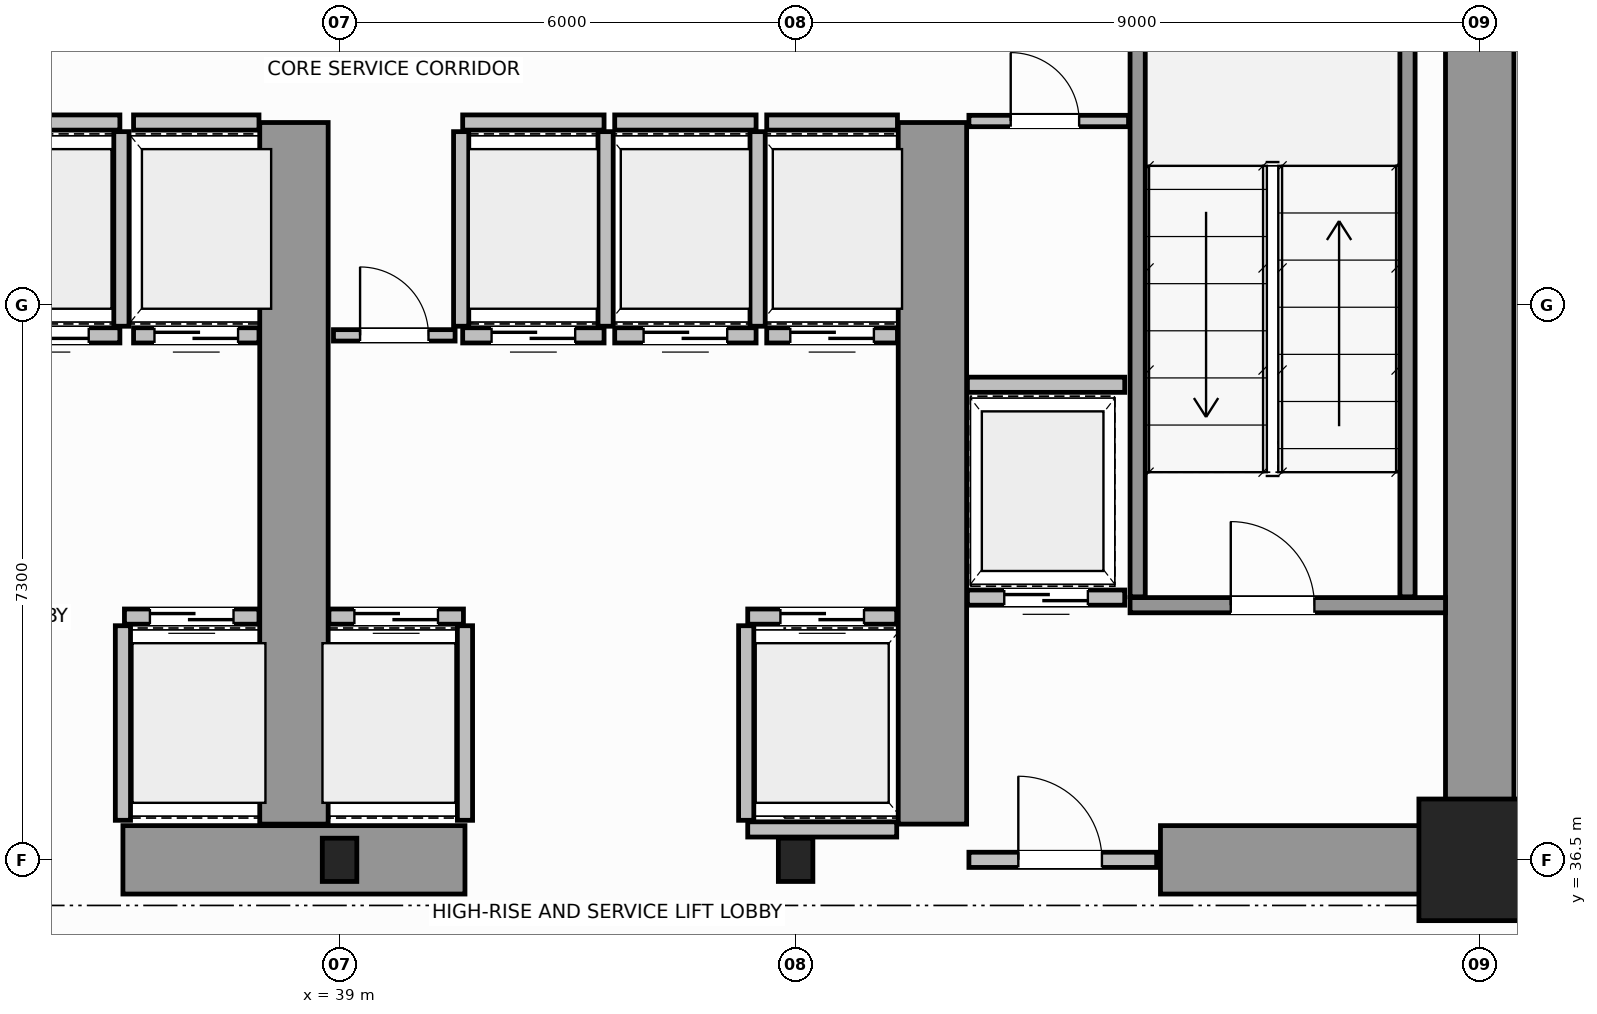
"""IFC4 building model, lengths in metres.
Left out: names, types, materials, properties, quantities, classifications, styles, units other than length and angle.
Written with IfcOpenShell. Run it as: python <this file> out.ifc"""

import sys

from ifc_helpers import new_model, si_unit, direction, frame, frame_2d, origin, origin_2d, place, context, subcontext, project, spatial, rectangle, i_section, extrude, source, transform, mapped, element, fill, save


model = new_model("IFC4")
c1 = context("Model", 3, precision=1e-05, world=origin(), true_north=direction((0.0, 1.0)))
c2 = subcontext(c1, "Body", "Model", "MODEL_VIEW")
j1 = project(units=[si_unit("LENGTHUNIT", "METRE"), si_unit("PLANEANGLEUNIT", "RADIAN")], contexts=[c1])
p1 = place(None, origin())
s1 = spatial("IfcSite", under=j1, at=p1, CompositionType="ELEMENT")
p2 = place(p1, origin())
s2 = spatial("IfcBuilding", under=s1, at=p2, CompositionType="ELEMENT")
p3 = place(p2, frame((0.0, 0.0, 5.6)))
s3 = spatial("IfcBuildingStorey", under=s2, at=p3, CompositionType="ELEMENT", Elevation=5.6)
m1 = source(origin(), c2, "Body", "SweptSolid", [
    extrude(i_section(OverallWidth=0.454, OverallDepth=0.569, WebThickness=0.078, FlangeThickness=0.08, FilletRadius=0.015, at=origin_2d()), origin(), (0.0, 0.0, 1.0), 4.4),
])
for number, where, z_axis, x_axis in (
    (1, (39.0, 36.5, 0.0), (0.0, 0.0, 1.0), (1.0, 0.0, 0.0)),
    (2, (45.0, 36.5, 0.0), (0.0, 0.0, 1.0), (1.0, 0.0, 0.0)),
):
    element("IfcColumn", number, at=place(p3, frame(where, z_axis=z_axis, x_axis=x_axis)), inside=s3, PredefinedType="COLUMN", context=c2, shape_type="MappedRepresentation", body=[
        mapped(m1, transform((0.0, 0.0, 0.0), scale=1.0)),
    ])
m2 = source(origin(), c2, "Body", "SweptSolid", [
    extrude(rectangle(XDim=1.6, YDim=1.6, at=origin_2d()), origin(), (0.0, 0.0, 1.0), 4.4),
])
p4 = place(p3, frame((54.0, 36.5, 0.0), z_axis=(0.0, 0.0, 1.0), x_axis=(1.0, 0.0, 0.0)))
e3 = element("IfcColumn", 3, at=p4, inside=s3, PredefinedType="COLUMN", context=c2, shape_type="MappedRepresentation", body=[
    mapped(m2, transform((0.0, 0.0, 0.0), scale=1.0)),
])
p5 = place(p3, frame((54.0, 36.5, 0.0), z_axis=(0.0, 0.0, 1.0), x_axis=(0.0, 1.0, 0.0)))
e4 = element("IfcWall", 4, at=p5, inside=s3, PredefinedType="SHEAR", context=c2, shape_type="SweptSolid", body=[
    extrude(rectangle(XDim=14.5, YDim=0.9, at=frame_2d((7.25, 0.0))), origin(), (0.0, 0.0, 1.0), 4.4),
])
p6 = place(p3, frame((36.15, 36.5, 0.0), z_axis=(0.0, 0.0, 1.0), x_axis=(1.0, 0.0, 0.0)))
e5 = element("IfcWall", 5, at=p6, inside=s3, PredefinedType="SHEAR", context=c2, shape_type="SweptSolid", body=[
    extrude(rectangle(XDim=4.5, YDim=0.9, at=frame_2d((2.25, 0.0))), origin(), (0.0, 0.0, 1.0), 4.4),
])
p7 = place(p3, frame((49.8, 36.5, 0.0), z_axis=(0.0, 0.0, 1.0), x_axis=(1.0, 0.0, 0.0)))
e6 = element("IfcWall", 6, at=p7, inside=s3, PredefinedType="SHEAR", context=c2, shape_type="SweptSolid", body=[
    extrude(rectangle(XDim=3.73, YDim=0.9, at=frame_2d((1.865, 0.0))), origin(), (0.0, 0.0, 1.0), 2.92),
])
for number, where, z_axis, x_axis in (
    (7, (38.4, 36.97, 0.0), (0.0, 0.0, 1.0), (0.0, 1.0, 0.0)),
    (8, (46.8, 36.97, 0.0), (0.0, 0.0, 1.0), (0.0, 1.0, 0.0)),
):
    element("IfcWall", number, at=place(p3, frame(where, z_axis=z_axis, x_axis=x_axis)), inside=s3, PredefinedType="SHEAR", context=c2, shape_type="SweptSolid", body=[
        extrude(rectangle(XDim=9.23, YDim=0.9, at=frame_2d((4.615, 0.0))), origin(), (0.0, 0.0, 1.0), 4.4),
    ])
p8 = place(p3, frame((49.4, 39.85, 0.0), z_axis=(0.0, 0.0, 1.0), x_axis=(1.0, 0.0, 0.0)))
e9 = element("IfcWall", 9, at=p8, inside=s3, PredefinedType="SOLIDWALL", context=c2, shape_type="SweptSolid", body=[
    extrude(rectangle(XDim=4.15, YDim=0.2, at=frame_2d((2.075, 0.0))), origin(), (0.0, 0.0, 1.0), 4.4),
])
p9 = place(p8, frame((1.325, 0.0, 0.0)))
e10 = element("IfcOpeningElement", 10, at=p9, cuts=e9, PredefinedType="OPENING", context=c2, shape_type="SweptSolid", body=[
    extrude(rectangle(XDim=1.1, YDim=2.15, at=frame_2d((0.55, 1.075))), frame((0.0, 0.11, 0.0), z_axis=(0.0, -1.0, 0.0), x_axis=(1.0, 0.0, 0.0)), (0.0, 0.0, 1.0), 0.22),
])
for number, where, z_axis, x_axis in (
    (11, (49.5, 39.96, 0.0), (0.0, 0.0, 1.0), (0.0, 1.0, 0.0)),
    (12, (53.05, 39.96, 0.0), (0.0, 0.0, 1.0), (0.0, 1.0, 0.0)),
):
    element("IfcWall", number, at=place(p3, frame(where, z_axis=z_axis, x_axis=x_axis)), inside=s3, PredefinedType="SOLIDWALL", context=c2, shape_type="SweptSolid", body=[
        extrude(rectangle(XDim=9.93, YDim=0.2, at=frame_2d((4.965, 0.0))), origin(), (0.0, 0.0, 1.0), 4.4),
    ])
p10 = place(p3, frame((47.28, 36.5, 0.0), z_axis=(0.0, 0.0, 1.0), x_axis=(1.0, 0.0, 0.0)))
e13 = element("IfcWall", 13, at=p10, inside=s3, PredefinedType="SOLIDWALL", context=c2, shape_type="SweptSolid", body=[
    extrude(rectangle(XDim=2.47, YDim=0.2, at=frame_2d((1.235, 0.0))), origin(), (0.0, 0.0, 1.0), 2.91),
])
p11 = place(p10, frame((0.65, 0.0, 0.0)))
e14 = element("IfcOpeningElement", 14, at=p11, cuts=e13, PredefinedType="OPENING", context=c2, shape_type="SweptSolid", body=[
    extrude(rectangle(XDim=1.1, YDim=2.15, at=frame_2d((0.55, 1.075))), frame((0.0, 0.11, 0.0), z_axis=(0.0, -1.0, 0.0), x_axis=(1.0, 0.0, 0.0)), (0.0, 0.0, 1.0), 0.22),
])
p12 = place(p3, frame((36.17, 39.7, 0.0), z_axis=(0.0, 0.0, 1.0), x_axis=(1.0, 0.0, 0.0)))
e15 = element("IfcWall", 15, at=p12, inside=s3, PredefinedType="SOLIDWALL", context=c2, shape_type="SweptSolid", body=[
    extrude(rectangle(XDim=1.77, YDim=0.2, at=frame_2d((0.885, 0.0))), origin(), (0.0, 0.0, 1.0), 4.12),
])
p13 = place(p12, frame((0.335, 0.0, 0.0)))
e16 = element("IfcOpeningElement", 16, at=p13, cuts=e15, PredefinedType="OPENING", context=c2, shape_type="SweptSolid", body=[
    extrude(rectangle(XDim=1.1, YDim=2.15, at=frame_2d((0.55, 1.075))), frame((0.0, 0.11, 0.0), z_axis=(0.0, -1.0, 0.0), x_axis=(1.0, 0.0, 0.0)), (0.0, 0.0, 1.0), 0.22),
])
p14 = place(p3, frame((36.15, 37.02, 0.0), z_axis=(0.0, 0.0, 1.0), x_axis=(0.0, 1.0, 0.0)))
e17 = element("IfcWall", 17, at=p14, inside=s3, PredefinedType="SOLIDWALL", context=c2, shape_type="SweptSolid", body=[
    extrude(rectangle(XDim=2.56, YDim=0.2, at=frame_2d((1.28, 0.0))), origin(), (0.0, 0.0, 1.0), 4.12),
])
p15 = place(p3, frame((34.19, 43.4, 0.0), z_axis=(0.0, 0.0, 1.0), x_axis=(1.0, 0.0, 0.0)))
e18 = element("IfcWall", 18, at=p15, inside=s3, PredefinedType="SOLIDWALL", context=c2, shape_type="SweptSolid", body=[
    extrude(rectangle(XDim=1.92, YDim=0.2, at=frame_2d((0.96, 0.0))), origin(), (0.0, 0.0, 1.0), 4.12),
])
p16 = place(p15, frame((0.41, 0.0, 0.0)))
e19 = element("IfcOpeningElement", 19, at=p16, cuts=e18, PredefinedType="OPENING", context=c2, shape_type="SweptSolid", body=[
    extrude(rectangle(XDim=1.1, YDim=2.15, at=frame_2d((0.55, 1.075))), frame((0.0, 0.11, 0.0), z_axis=(0.0, -1.0, 0.0), x_axis=(1.0, 0.0, 0.0)), (0.0, 0.0, 1.0), 0.22),
])
p17 = place(p3, frame((34.19, 46.2, 0.0), z_axis=(0.0, 0.0, 1.0), x_axis=(1.0, 0.0, 0.0)))
e20 = element("IfcWall", 20, at=p17, inside=s3, PredefinedType="SOLIDWALL", context=c2, shape_type="SweptSolid", body=[
    extrude(rectangle(XDim=1.92, YDim=0.2, at=frame_2d((0.96, 0.0))), origin(), (0.0, 0.0, 1.0), 4.12),
])
p18 = place(p3, frame((36.13, 43.52, 0.0), z_axis=(0.0, 0.0, 1.0), x_axis=(0.0, 1.0, 0.0)))
e21 = element("IfcWall", 21, at=p18, inside=s3, PredefinedType="SOLIDWALL", context=c2, shape_type="SweptSolid", body=[
    extrude(rectangle(XDim=2.56, YDim=0.2, at=frame_2d((1.28, 0.0))), origin(), (0.0, 0.0, 1.0), 4.12),
])
p19 = place(p3, frame((36.29, 43.4, 0.0), z_axis=(0.0, 0.0, 1.0), x_axis=(1.0, 0.0, 0.0)))
e22 = element("IfcWall", 22, at=p19, inside=s3, PredefinedType="SOLIDWALL", context=c2, shape_type="SweptSolid", body=[
    extrude(rectangle(XDim=1.65, YDim=0.2, at=frame_2d((0.825, 0.0))), origin(), (0.0, 0.0, 1.0), 4.12),
])
p20 = place(p19, frame((0.275, 0.0, 0.0)))
e23 = element("IfcOpeningElement", 23, at=p20, cuts=e22, PredefinedType="OPENING", context=c2, shape_type="SweptSolid", body=[
    extrude(rectangle(XDim=1.1, YDim=2.15, at=frame_2d((0.55, 1.075))), frame((0.0, 0.11, 0.0), z_axis=(0.0, -1.0, 0.0), x_axis=(1.0, 0.0, 0.0)), (0.0, 0.0, 1.0), 0.22),
])
p21 = place(p3, frame((36.29, 46.2, 0.0), z_axis=(0.0, 0.0, 1.0), x_axis=(1.0, 0.0, 0.0)))
e24 = element("IfcWall", 24, at=p21, inside=s3, PredefinedType="SOLIDWALL", context=c2, shape_type="SweptSolid", body=[
    extrude(rectangle(XDim=1.65, YDim=0.2, at=frame_2d((0.825, 0.0))), origin(), (0.0, 0.0, 1.0), 4.12),
])
p22 = place(p3, frame((38.86, 39.7, 0.0), z_axis=(0.0, 0.0, 1.0), x_axis=(1.0, 0.0, 0.0)))
e25 = element("IfcWall", 25, at=p22, inside=s3, PredefinedType="SOLIDWALL", context=c2, shape_type="SweptSolid", body=[
    extrude(rectangle(XDim=1.77, YDim=0.2, at=frame_2d((0.885, 0.0))), origin(), (0.0, 0.0, 1.0), 4.12),
])
p23 = place(p22, frame((0.335, 0.0, 0.0)))
e26 = element("IfcOpeningElement", 26, at=p23, cuts=e25, PredefinedType="OPENING", context=c2, shape_type="SweptSolid", body=[
    extrude(rectangle(XDim=1.1, YDim=2.15, at=frame_2d((0.55, 1.075))), frame((0.0, 0.11, 0.0), z_axis=(0.0, -1.0, 0.0), x_axis=(1.0, 0.0, 0.0)), (0.0, 0.0, 1.0), 0.22),
])
p24 = place(p3, frame((40.65, 37.02, 0.0), z_axis=(0.0, 0.0, 1.0), x_axis=(0.0, 1.0, 0.0)))
e27 = element("IfcWall", 27, at=p24, inside=s3, PredefinedType="SOLIDWALL", context=c2, shape_type="SweptSolid", body=[
    extrude(rectangle(XDim=2.56, YDim=0.2, at=frame_2d((1.28, 0.0))), origin(), (0.0, 0.0, 1.0), 4.12),
])
p25 = place(p3, frame((44.37, 39.7, 0.0), z_axis=(0.0, 0.0, 1.0), x_axis=(1.0, 0.0, 0.0)))
e28 = element("IfcWall", 28, at=p25, inside=s3, PredefinedType="SOLIDWALL", context=c2, shape_type="SweptSolid", body=[
    extrude(rectangle(XDim=1.96, YDim=0.2, at=frame_2d((0.98, 0.0))), origin(), (0.0, 0.0, 1.0), 4.12),
])
p26 = place(p25, frame((0.43, 0.0, 0.0)))
e29 = element("IfcOpeningElement", 29, at=p26, cuts=e28, PredefinedType="OPENING", context=c2, shape_type="SweptSolid", body=[
    extrude(rectangle(XDim=1.1, YDim=2.15, at=frame_2d((0.55, 1.075))), frame((0.0, 0.11, 0.0), z_axis=(0.0, -1.0, 0.0), x_axis=(1.0, 0.0, 0.0)), (0.0, 0.0, 1.0), 0.22),
])
p27 = place(p3, frame((44.37, 36.9, 0.0), z_axis=(0.0, 0.0, 1.0), x_axis=(1.0, 0.0, 0.0)))
e30 = element("IfcWall", 30, at=p27, inside=s3, PredefinedType="SOLIDWALL", context=c2, shape_type="SweptSolid", body=[
    extrude(rectangle(XDim=1.96, YDim=0.2, at=frame_2d((0.98, 0.0))), origin(), (0.0, 0.0, 1.0), 2.91),
])
p28 = place(p3, frame((44.35, 37.02, 0.0), z_axis=(0.0, 0.0, 1.0), x_axis=(0.0, 1.0, 0.0)))
e31 = element("IfcWall", 31, at=p28, inside=s3, PredefinedType="SOLIDWALL", context=c2, shape_type="SweptSolid", body=[
    extrude(rectangle(XDim=2.56, YDim=0.2, at=frame_2d((1.28, 0.0))), origin(), (0.0, 0.0, 1.0), 4.12),
])
p29 = place(p3, frame((40.62, 43.4, 0.0), z_axis=(0.0, 0.0, 1.0), x_axis=(1.0, 0.0, 0.0)))
e32 = element("IfcWall", 32, at=p29, inside=s3, PredefinedType="SOLIDWALL", context=c2, shape_type="SweptSolid", body=[
    extrude(rectangle(XDim=1.86, YDim=0.2, at=frame_2d((0.93, 0.0))), origin(), (0.0, 0.0, 1.0), 4.12),
])
p30 = place(p29, frame((0.38, 0.0, 0.0)))
e33 = element("IfcOpeningElement", 33, at=p30, cuts=e32, PredefinedType="OPENING", context=c2, shape_type="SweptSolid", body=[
    extrude(rectangle(XDim=1.1, YDim=2.15, at=frame_2d((0.55, 1.075))), frame((0.0, 0.11, 0.0), z_axis=(0.0, -1.0, 0.0), x_axis=(1.0, 0.0, 0.0)), (0.0, 0.0, 1.0), 0.22),
])
p31 = place(p3, frame((40.62, 46.2, 0.0), z_axis=(0.0, 0.0, 1.0), x_axis=(1.0, 0.0, 0.0)))
e34 = element("IfcWall", 34, at=p31, inside=s3, PredefinedType="SOLIDWALL", context=c2, shape_type="SweptSolid", body=[
    extrude(rectangle(XDim=1.86, YDim=0.2, at=frame_2d((0.93, 0.0))), origin(), (0.0, 0.0, 1.0), 4.12),
])
for number, where, z_axis, x_axis in (
    (35, (40.6, 43.52, 0.0), (0.0, 0.0, 1.0), (0.0, 1.0, 0.0)),
    (36, (42.5, 43.52, 0.0), (0.0, 0.0, 1.0), (0.0, 1.0, 0.0)),
):
    element("IfcWall", number, at=place(p3, frame(where, z_axis=z_axis, x_axis=x_axis)), inside=s3, PredefinedType="SOLIDWALL", context=c2, shape_type="SweptSolid", body=[
        extrude(rectangle(XDim=2.56, YDim=0.2, at=frame_2d((1.28, 0.0))), origin(), (0.0, 0.0, 1.0), 4.12),
    ])
p32 = place(p3, frame((42.62, 43.4, 0.0), z_axis=(0.0, 0.0, 1.0), x_axis=(1.0, 0.0, 0.0)))
e37 = element("IfcWall", 37, at=p32, inside=s3, PredefinedType="SOLIDWALL", context=c2, shape_type="SweptSolid", body=[
    extrude(rectangle(XDim=1.86, YDim=0.2, at=frame_2d((0.93, 0.0))), origin(), (0.0, 0.0, 1.0), 4.12),
])
p33 = place(p32, frame((0.38, 0.0, 0.0)))
e38 = element("IfcOpeningElement", 38, at=p33, cuts=e37, PredefinedType="OPENING", context=c2, shape_type="SweptSolid", body=[
    extrude(rectangle(XDim=1.1, YDim=2.15, at=frame_2d((0.55, 1.075))), frame((0.0, 0.11, 0.0), z_axis=(0.0, -1.0, 0.0), x_axis=(1.0, 0.0, 0.0)), (0.0, 0.0, 1.0), 0.22),
])
p34 = place(p3, frame((42.62, 46.2, 0.0), z_axis=(0.0, 0.0, 1.0), x_axis=(1.0, 0.0, 0.0)))
e39 = element("IfcWall", 39, at=p34, inside=s3, PredefinedType="SOLIDWALL", context=c2, shape_type="SweptSolid", body=[
    extrude(rectangle(XDim=1.86, YDim=0.2, at=frame_2d((0.93, 0.0))), origin(), (0.0, 0.0, 1.0), 4.12),
])
p35 = place(p3, frame((44.5, 43.52, 0.0), z_axis=(0.0, 0.0, 1.0), x_axis=(0.0, 1.0, 0.0)))
e40 = element("IfcWall", 40, at=p35, inside=s3, PredefinedType="SOLIDWALL", context=c2, shape_type="SweptSolid", body=[
    extrude(rectangle(XDim=2.56, YDim=0.2, at=frame_2d((1.28, 0.0))), origin(), (0.0, 0.0, 1.0), 4.12),
])
p36 = place(p3, frame((44.62, 43.4, 0.0), z_axis=(0.0, 0.0, 1.0), x_axis=(1.0, 0.0, 0.0)))
e41 = element("IfcWall", 41, at=p36, inside=s3, PredefinedType="SOLIDWALL", context=c2, shape_type="SweptSolid", body=[
    extrude(rectangle(XDim=1.72, YDim=0.2, at=frame_2d((0.86, 0.0))), origin(), (0.0, 0.0, 1.0), 4.12),
])
p37 = place(p36, frame((0.31, 0.0, 0.0)))
e42 = element("IfcOpeningElement", 42, at=p37, cuts=e41, PredefinedType="OPENING", context=c2, shape_type="SweptSolid", body=[
    extrude(rectangle(XDim=1.1, YDim=2.15, at=frame_2d((0.55, 1.075))), frame((0.0, 0.11, 0.0), z_axis=(0.0, -1.0, 0.0), x_axis=(1.0, 0.0, 0.0)), (0.0, 0.0, 1.0), 0.22),
])
p38 = place(p3, frame((44.62, 46.2, 0.0), z_axis=(0.0, 0.0, 1.0), x_axis=(1.0, 0.0, 0.0)))
e43 = element("IfcWall", 43, at=p38, inside=s3, PredefinedType="SOLIDWALL", context=c2, shape_type="SweptSolid", body=[
    extrude(rectangle(XDim=1.72, YDim=0.2, at=frame_2d((0.86, 0.0))), origin(), (0.0, 0.0, 1.0), 4.12),
])
p39 = place(p3, frame((47.26, 39.95, 0.0), z_axis=(0.0, 0.0, 1.0), x_axis=(1.0, 0.0, 0.0)))
e44 = element("IfcWall", 44, at=p39, inside=s3, PredefinedType="SOLIDWALL", context=c2, shape_type="SweptSolid", body=[
    extrude(rectangle(XDim=2.07, YDim=0.2, at=frame_2d((1.035, 0.0))), origin(), (0.0, 0.0, 1.0), 4.12),
])
p40 = place(p39, frame((0.485, 0.0, 0.0)))
e45 = element("IfcOpeningElement", 45, at=p40, cuts=e44, PredefinedType="OPENING", context=c2, shape_type="SweptSolid", body=[
    extrude(rectangle(XDim=1.1, YDim=2.15, at=frame_2d((0.55, 1.075))), frame((0.0, 0.11, 0.0), z_axis=(0.0, -1.0, 0.0), x_axis=(1.0, 0.0, 0.0)), (0.0, 0.0, 1.0), 0.22),
])
p41 = place(p3, frame((47.26, 42.75, 0.0), z_axis=(0.0, 0.0, 1.0), x_axis=(1.0, 0.0, 0.0)))
e46 = element("IfcWall", 46, at=p41, inside=s3, PredefinedType="SOLIDWALL", context=c2, shape_type="SweptSolid", body=[
    extrude(rectangle(XDim=2.07, YDim=0.2, at=frame_2d((1.035, 0.0))), origin(), (0.0, 0.0, 1.0), 4.12),
])
p42 = place(p3, frame((47.28, 46.22, 0.0), z_axis=(0.0, 0.0, 1.0), x_axis=(1.0, 0.0, 0.0)))
e47 = element("IfcWall", 47, at=p42, inside=s3, PredefinedType="PARTITIONING", context=c2, shape_type="SweptSolid", body=[
    extrude(rectangle(XDim=2.1, YDim=0.15, at=frame_2d((1.05, 0.0))), origin(), (0.0, 0.0, 1.0), 4.12),
])
p43 = place(p42, frame((0.55, 0.0, 0.0)))
e48 = element("IfcOpeningElement", 48, at=p43, cuts=e47, PredefinedType="OPENING", context=c2, shape_type="SweptSolid", body=[
    extrude(rectangle(XDim=0.9, YDim=2.1, at=frame_2d((0.45, 1.05))), frame((0.0, 0.085, 0.0), z_axis=(0.0, -1.0, 0.0), x_axis=(1.0, 0.0, 0.0)), (0.0, 0.0, 1.0), 0.17),
])
p44 = place(p3, frame((38.92, 43.4, 0.0), z_axis=(0.0, 0.0, 1.0), x_axis=(1.0, 0.0, 0.0)))
e49 = element("IfcWall", 49, at=p44, inside=s3, PredefinedType="PARTITIONING", context=c2, shape_type="SweptSolid", body=[
    extrude(rectangle(XDim=1.6, YDim=0.15, at=frame_2d((0.8, 0.0))), origin(), (0.0, 0.0, 1.0), 4.12),
])
p45 = place(p44, frame((0.35, 0.0, 0.0)))
e50 = element("IfcOpeningElement", 50, at=p45, cuts=e49, PredefinedType="OPENING", context=c2, shape_type="SweptSolid", body=[
    extrude(rectangle(XDim=0.9, YDim=2.1, at=frame_2d((0.45, 1.05))), frame((0.0, 0.085, 0.0), z_axis=(0.0, -1.0, 0.0), x_axis=(1.0, 0.0, 0.0)), (0.0, 0.0, 1.0), 0.17),
])
m3 = source(origin(), c2, "Body", "SweptSolid", [
    extrude(rectangle(XDim=1.1, YDim=2.15, at=frame_2d((0.55, 1.075))), frame((0.0, 0.025, 0.0), z_axis=(0.0, -1.0, 0.0), x_axis=(1.0, 0.0, 0.0)), (0.0, 0.0, 1.0), 0.05),
])
p46 = place(p9, origin())
e51 = element("IfcDoor", 51, at=p46, inside=s3, OperationType="SINGLE_SWING_RIGHT", PredefinedType="DOOR", context=c2, shape_type="MappedRepresentation", body=[
    mapped(m3, transform((0.0, 0.0, 0.0), scale=1.0)),
])
fill(e10, e51)
p47 = place(p11, origin())
e52 = element("IfcDoor", 52, at=p47, inside=s3, OperationType="SINGLE_SWING_LEFT", PredefinedType="DOOR", context=c2, shape_type="MappedRepresentation", body=[
    mapped(m3, transform((0.0, 0.0, 0.0), scale=1.0)),
])
fill(e14, e52)
p48 = place(p13, origin())
e53 = element("IfcDoor", 53, at=p48, inside=s3, OperationType="DOUBLE_DOOR_SLIDING", PredefinedType="DOOR", context=c2, shape_type="MappedRepresentation", body=[
    mapped(m3, transform((0.0, 0.0, 0.0), scale=1.0)),
])
fill(e16, e53)
p49 = place(p16, origin())
e54 = element("IfcDoor", 54, at=p49, inside=s3, OperationType="DOUBLE_DOOR_SLIDING", PredefinedType="DOOR", context=c2, shape_type="MappedRepresentation", body=[
    mapped(m3, transform((0.0, 0.0, 0.0), scale=1.0)),
])
fill(e19, e54)
p50 = place(p20, origin())
e55 = element("IfcDoor", 55, at=p50, inside=s3, OperationType="DOUBLE_DOOR_SLIDING", PredefinedType="DOOR", context=c2, shape_type="MappedRepresentation", body=[
    mapped(m3, transform((0.0, 0.0, 0.0), scale=1.0)),
])
fill(e23, e55)
p51 = place(p23, origin())
e56 = element("IfcDoor", 56, at=p51, inside=s3, OperationType="DOUBLE_DOOR_SLIDING", PredefinedType="DOOR", context=c2, shape_type="MappedRepresentation", body=[
    mapped(m3, transform((0.0, 0.0, 0.0), scale=1.0)),
])
fill(e26, e56)
p52 = place(p26, origin())
e57 = element("IfcDoor", 57, at=p52, inside=s3, OperationType="DOUBLE_DOOR_SLIDING", PredefinedType="DOOR", context=c2, shape_type="MappedRepresentation", body=[
    mapped(m3, transform((0.0, 0.0, 0.0), scale=1.0)),
])
fill(e29, e57)
p53 = place(p30, origin())
e58 = element("IfcDoor", 58, at=p53, inside=s3, OperationType="DOUBLE_DOOR_SLIDING", PredefinedType="DOOR", context=c2, shape_type="MappedRepresentation", body=[
    mapped(m3, transform((0.0, 0.0, 0.0), scale=1.0)),
])
fill(e33, e58)
p54 = place(p33, origin())
e59 = element("IfcDoor", 59, at=p54, inside=s3, OperationType="DOUBLE_DOOR_SLIDING", PredefinedType="DOOR", context=c2, shape_type="MappedRepresentation", body=[
    mapped(m3, transform((0.0, 0.0, 0.0), scale=1.0)),
])
fill(e38, e59)
p55 = place(p37, origin())
e60 = element("IfcDoor", 60, at=p55, inside=s3, OperationType="DOUBLE_DOOR_SLIDING", PredefinedType="DOOR", context=c2, shape_type="MappedRepresentation", body=[
    mapped(m3, transform((0.0, 0.0, 0.0), scale=1.0)),
])
fill(e42, e60)
p56 = place(p40, origin())
e61 = element("IfcDoor", 61, at=p56, inside=s3, OperationType="DOUBLE_DOOR_SLIDING", PredefinedType="DOOR", context=c2, shape_type="MappedRepresentation", body=[
    mapped(m3, transform((0.0, 0.0, 0.0), scale=1.0)),
])
fill(e45, e61)
m4 = source(origin(), c2, "Body", "SweptSolid", [
    extrude(rectangle(XDim=0.9, YDim=2.1, at=frame_2d((0.45, 1.05))), frame((0.0, 0.025, 0.0), z_axis=(0.0, -1.0, 0.0), x_axis=(1.0, 0.0, 0.0)), (0.0, 0.0, 1.0), 0.05),
])
p57 = place(p43, origin())
e62 = element("IfcDoor", 62, at=p57, inside=s3, OperationType="SINGLE_SWING_RIGHT", PredefinedType="DOOR", context=c2, shape_type="MappedRepresentation", body=[
    mapped(m4, transform((0.0, 0.0, 0.0), scale=1.0)),
])
fill(e48, e62)
p58 = place(p45, origin())
e63 = element("IfcDoor", 63, at=p58, inside=s3, OperationType="SINGLE_SWING_LEFT", PredefinedType="DOOR", context=c2, shape_type="MappedRepresentation", body=[
    mapped(m4, transform((0.0, 0.0, 0.0), scale=1.0)),
])
fill(e50, e63)
save(model, sys.argv[1])
